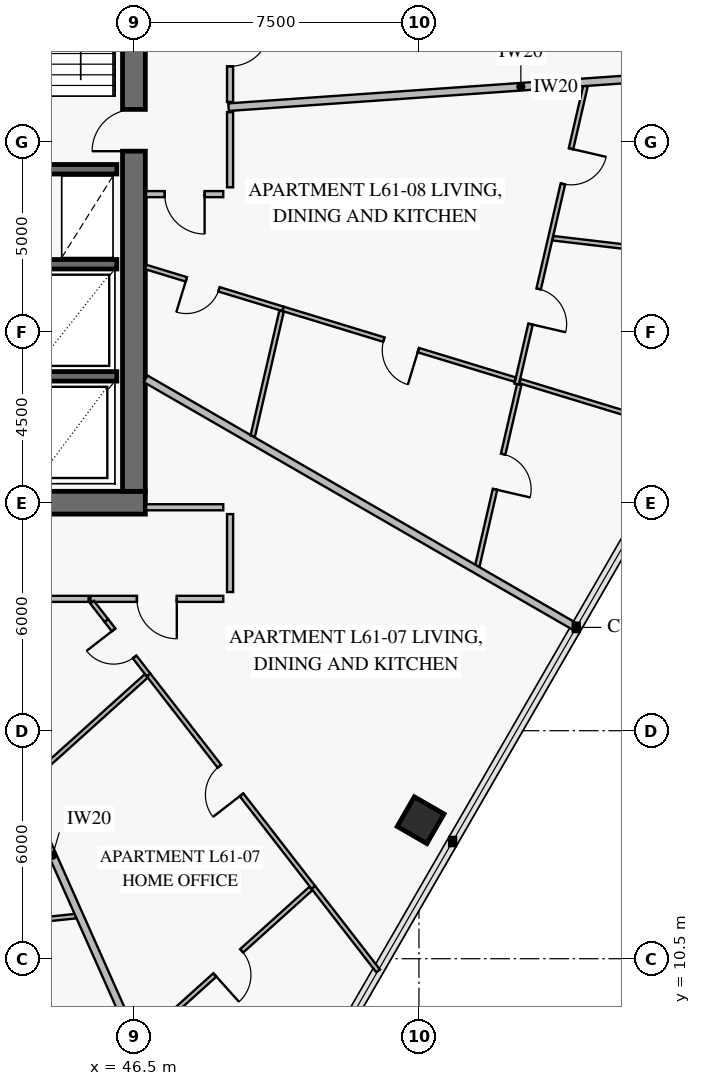
"""IFC4 building model, lengths in metres.
Left out: names, types, materials, properties, quantities, classifications, styles, units other than length and angle.
Written with IfcOpenShell. Run it as: python <this file> out.ifc"""

import sys

from ifc_helpers import new_model, si_unit, direction, frame, frame_2d, origin, origin_2d, place, context, subcontext, project, spatial, rectangle, extrude, element, fill, save


model = new_model("IFC4")
c1 = context("Model", 3, precision=1e-05, world=origin(), true_north=direction((0.0, 1.0)))
c2 = subcontext(c1, "Body", "Model", "MODEL_VIEW")
j1 = project(units=[si_unit("LENGTHUNIT", "METRE"), si_unit("PLANEANGLEUNIT", "RADIAN")], contexts=[c1])
p1 = place(None, origin())
s1 = spatial("IfcSite", under=j1, at=p1, CompositionType="ELEMENT")
p2 = place(p1, origin())
s2 = spatial("IfcBuilding", under=s1, at=p2, CompositionType="ELEMENT")
p3 = place(p2, frame((0.0, 0.0, 242.6)))
s3 = spatial("IfcBuildingStorey", under=s2, at=p3, CompositionType="ELEMENT", Elevation=242.6)
p4 = place(p3, frame((37.35, 22.5, 0.0), z_axis=(0.0, 0.0, 1.0), x_axis=(1.0, 0.0, 0.0)))
e1 = element("IfcWall", 1, at=p4, inside=s3, PredefinedType="SHEAR", context=c2, shape_type="SweptSolid", body=[
    extrude(rectangle(XDim=9.45, YDim=0.6, at=frame_2d((4.725, 0.0))), origin(), (0.0, 0.0, 1.0), 3.8),
])
p5 = place(p4, frame((3.95, 0.0, 0.0)))
e2 = element("IfcOpeningElement", 2, at=p5, cuts=e1, PredefinedType="OPENING", context=c2, shape_type="SweptSolid", body=[
    extrude(rectangle(XDim=1.5, YDim=2.15, at=frame_2d((0.75, 1.075))), frame((0.0, 0.312, 0.0), z_axis=(0.0, -1.0, 0.0), x_axis=(1.0, 0.0, 0.0)), (0.0, 0.0, 1.0), 0.624),
])
p6 = place(p3, frame((46.5, 22.8, 0.0), z_axis=(0.0, 0.0, 1.0), x_axis=(0.0, 1.0, 0.0)))
e3 = element("IfcWall", 3, at=p6, inside=s3, PredefinedType="SHEAR", context=c2, shape_type="SweptSolid", body=[
    extrude(rectangle(XDim=18.4, YDim=0.6, at=frame_2d((9.2, 0.0))), origin(), (0.0, 0.0, 1.0), 3.8),
])
p7 = place(p6, frame((8.95, 0.0, 0.0)))
e4 = element("IfcOpeningElement", 4, at=p7, cuts=e3, PredefinedType="OPENING", context=c2, shape_type="SweptSolid", body=[
    extrude(rectangle(XDim=1.1, YDim=2.15, at=frame_2d((0.55, 1.075))), frame((0.0, 0.312, 0.0), z_axis=(0.0, -1.0, 0.0), x_axis=(1.0, 0.0, 0.0)), (0.0, 0.0, 1.0), 0.624),
])
p8 = place(p3, frame((54.044, 14.145, 0.0), z_axis=(0.0, 0.0, 1.0), x_axis=(0.5, 0.866025403784, 0.0)))
e5 = element("IfcColumn", 5, at=p8, inside=s3, PredefinedType="COLUMN", context=c2, shape_type="SweptSolid", body=[
    extrude(rectangle(XDim=0.9, YDim=0.9, at=origin_2d()), origin(), (0.0, 0.0, 1.0), 3.55),
])
p9 = place(p3, frame((25.95, 31.275, 0.0), z_axis=(0.0, 0.0, 1.0), x_axis=(1.0, 0.0, 0.0)))
e6 = element("IfcWall", 6, at=p9, inside=s3, PredefinedType="SOLIDWALL", context=c2, shape_type="SweptSolid", body=[
    extrude(rectangle(XDim=20.1, YDim=0.25, at=frame_2d((10.05, 0.0))), origin(), (0.0, 0.0, 1.0), 3.8),
])
p10 = place(p9, frame((2.6, 0.0, 0.0)))
e7 = element("IfcOpeningElement", 7, at=p10, cuts=e6, PredefinedType="OPENING", context=c2, shape_type="SweptSolid", body=[
    extrude(rectangle(XDim=1.1, YDim=2.15, at=frame_2d((0.55, 1.075))), frame((0.0, 0.137, 0.0), z_axis=(0.0, -1.0, 0.0), x_axis=(1.0, 0.0, 0.0)), (0.0, 0.0, 1.0), 0.274),
])
p11 = place(p9, frame((10.6, 0.0, 0.0)))
e8 = element("IfcOpeningElement", 8, at=p11, cuts=e6, PredefinedType="OPENING", context=c2, shape_type="SweptSolid", body=[
    extrude(rectangle(XDim=1.1, YDim=2.15, at=frame_2d((0.55, 1.075))), frame((0.0, 0.137, 0.0), z_axis=(0.0, -1.0, 0.0), x_axis=(1.0, 0.0, 0.0)), (0.0, 0.0, 1.0), 0.274),
])
p12 = place(p9, frame((16.35, 0.0, 0.0)))
e9 = element("IfcOpeningElement", 9, at=p12, cuts=e6, PredefinedType="OPENING", context=c2, shape_type="SweptSolid", body=[
    extrude(rectangle(XDim=1.1, YDim=2.15, at=frame_2d((0.55, 1.075))), frame((0.0, 0.137, 0.0), z_axis=(0.0, -1.0, 0.0), x_axis=(1.0, 0.0, 0.0)), (0.0, 0.0, 1.0), 0.274),
])
for number, where, z_axis, x_axis in (
    (10, (43.8, 25.825, 0.0), (0.0, 0.0, 1.0), (1.0, 0.0, 0.0)),
    (11, (43.8, 28.775, 0.0), (0.0, 0.0, 1.0), (1.0, 0.0, 0.0)),
):
    element("IfcWall", number, at=place(p3, frame(where, z_axis=z_axis, x_axis=x_axis)), inside=s3, PredefinedType="SOLIDWALL", context=c2, shape_type="SweptSolid", body=[
        extrude(rectangle(XDim=2.25, YDim=0.25, at=frame_2d((1.125, 0.0))), origin(), (0.0, 0.0, 1.0), 3.8),
    ])
p13 = place(p3, frame((35.658, 10.642, 0.0), z_axis=(0.0, 0.0, 1.0), x_axis=(0.994519444743, 0.104551776778, 0.0)))
e12 = element("IfcWall", 12, at=p13, inside=s3, PredefinedType="PARTITIONING", context=c2, shape_type="SweptSolid", body=[
    extrude(rectangle(XDim=9.364, YDim=0.12, at=frame_2d((4.682, 0.0))), origin(), (0.0, 0.0, 1.0), 2.95),
])
p14 = place(p13, frame((1.939, 0.0, 0.0)))
e13 = element("IfcOpeningElement", 13, at=p14, cuts=e12, PredefinedType="OPENING", context=c2, shape_type="SweptSolid", body=[
    extrude(rectangle(XDim=0.95, YDim=2.1, at=frame_2d((0.475, 1.05))), frame((0.0, 0.072, 0.0), z_axis=(0.0, -1.0, 0.0), x_axis=(1.0, 0.0, 0.0)), (0.0, 0.0, 1.0), 0.144),
])
p15 = place(p13, frame((6.38, 0.0, 0.0)))
e14 = element("IfcOpeningElement", 14, at=p15, cuts=e12, PredefinedType="OPENING", context=c2, shape_type="SweptSolid", body=[
    extrude(rectangle(XDim=0.95, YDim=2.1, at=frame_2d((0.475, 1.05))), frame((0.0, 0.072, 0.0), z_axis=(0.0, -1.0, 0.0), x_axis=(1.0, 0.0, 0.0)), (0.0, 0.0, 1.0), 0.144),
])
p16 = place(p3, frame((45.773, 19.4, 0.0), z_axis=(0.0, 0.0, 1.0), x_axis=(0.612972513082, -0.790104232495, 0.0)))
e15 = element("IfcWall", 15, at=p16, inside=s3, PredefinedType="PARTITIONING", context=c2, shape_type="SweptSolid", body=[
    extrude(rectangle(XDim=1.817, YDim=0.12, at=frame_2d((0.908, 0.0))), origin(), (0.0, 0.0, 1.0), 3.55),
])
p17 = place(p16, frame((0.313, 0.0, 0.0)))
e16 = element("IfcOpeningElement", 16, at=p17, cuts=e15, PredefinedType="OPENING", context=c2, shape_type="SweptSolid", body=[
    extrude(rectangle(XDim=0.9, YDim=2.1, at=frame_2d((0.45, 1.05))), frame((0.0, 0.072, 0.0), z_axis=(0.0, -1.0, 0.0), x_axis=(1.0, 0.0, 0.0)), (0.0, 0.0, 1.0), 0.144),
])
p18 = place(p3, frame((46.887, 17.965, 0.0), z_axis=(0.0, 0.0, 1.0), x_axis=(0.612896077685, -0.790163526087, 0.0)))
e17 = element("IfcWall", 17, at=p18, inside=s3, PredefinedType="PARTITIONING", context=c2, shape_type="SweptSolid", body=[
    extrude(rectangle(XDim=7.075, YDim=0.12, at=frame_2d((3.538, 0.0))), origin(), (0.0, 0.0, 1.0), 2.93),
])
p19 = place(p18, frame((3.038, 0.0, 0.0)))
e18 = element("IfcOpeningElement", 18, at=p19, cuts=e17, PredefinedType="OPENING", context=c2, shape_type="SweptSolid", body=[
    extrude(rectangle(XDim=0.95, YDim=2.1, at=frame_2d((0.475, 1.05))), frame((0.0, 0.072, 0.0), z_axis=(0.0, -1.0, 0.0), x_axis=(1.0, 0.0, 0.0)), (0.0, 0.0, 1.0), 0.144),
])
p20 = place(p3, frame((46.682, 8.319, 0.0), z_axis=(0.0, 0.0, 1.0), x_axis=(0.743153013224, 0.669121512834, 0.0)))
e19 = element("IfcWall", 19, at=p20, inside=s3, PredefinedType="PARTITIONING", context=c2, shape_type="SweptSolid", body=[
    extrude(rectangle(XDim=6.022, YDim=0.12, at=frame_2d((3.011, 0.0))), origin(), (0.0, 0.0, 1.0), 2.93),
])
p21 = place(p20, frame((2.62, 0.0, 0.0)))
e20 = element("IfcOpeningElement", 20, at=p21, cuts=e19, PredefinedType="OPENING", context=c2, shape_type="SweptSolid", body=[
    extrude(rectangle(XDim=0.95, YDim=2.1, at=frame_2d((0.475, 1.05))), frame((0.0, 0.072, 0.0), z_axis=(0.0, -1.0, 0.0), x_axis=(1.0, 0.0, 0.0)), (0.0, 0.0, 1.0), 0.144),
])
p22 = place(p3, frame((45.357, 19.97, 0.0), z_axis=(0.0, 0.0, 1.0), x_axis=(1.0, 0.0, 0.0)))
e21 = element("IfcWall", 21, at=p22, inside=s3, PredefinedType="PARTITIONING", context=c2, shape_type="SweptSolid", body=[
    extrude(rectangle(XDim=3.493, YDim=0.16, at=frame_2d((1.747, 0.0))), origin(), (0.0, 0.0, 1.0), 2.95),
])
p23 = place(p22, frame((1.222, 0.0, 0.0)))
e22 = element("IfcOpeningElement", 22, at=p23, cuts=e21, PredefinedType="OPENING", context=c2, shape_type="SweptSolid", body=[
    extrude(rectangle(XDim=1.05, YDim=2.15, at=frame_2d((0.525, 1.075))), frame((0.0, 0.092, 0.0), z_axis=(0.0, -1.0, 0.0), x_axis=(1.0, 0.0, 0.0)), (0.0, 0.0, 1.0), 0.184),
])
p24 = place(p3, frame((56.571, 25.622, 0.0), z_axis=(0.0, 0.0, 1.0), x_axis=(0.224956917684, 0.974368711108, 0.0)))
e23 = element("IfcWall", 23, at=p24, inside=s3, PredefinedType="PARTITIONING", context=c2, shape_type="SweptSolid", body=[
    extrude(rectangle(XDim=8.054, YDim=0.12, at=frame_2d((4.027, 0.0))), origin(), (0.0, 0.0, 1.0), 2.95),
])
p25 = place(p24, frame((1.619, 0.0, 0.0)))
e24 = element("IfcOpeningElement", 24, at=p25, cuts=e23, PredefinedType="OPENING", context=c2, shape_type="SweptSolid", body=[
    extrude(rectangle(XDim=0.95, YDim=2.1, at=frame_2d((0.475, 1.05))), frame((0.0, 0.072, 0.0), z_axis=(0.0, -1.0, 0.0), x_axis=(1.0, 0.0, 0.0)), (0.0, 0.0, 1.0), 0.144),
])
p26 = place(p24, frame((5.406, 0.0, 0.0)))
e25 = element("IfcOpeningElement", 25, at=p26, cuts=e23, PredefinedType="OPENING", context=c2, shape_type="SweptSolid", body=[
    extrude(rectangle(XDim=0.95, YDim=2.1, at=frame_2d((0.475, 1.05))), frame((0.0, 0.072, 0.0), z_axis=(0.0, -1.0, 0.0), x_axis=(1.0, 0.0, 0.0)), (0.0, 0.0, 1.0), 0.144),
])
p27 = place(p3, frame((46.808, 28.704, 0.0), z_axis=(0.0, 0.0, 1.0), x_axis=(0.956504815911, -0.291716535594, 0.0)))
e26 = element("IfcWall", 26, at=p27, inside=s3, PredefinedType="PARTITIONING", context=c2, shape_type="SweptSolid", body=[
    extrude(rectangle(XDim=3.781, YDim=0.12, at=frame_2d((1.891, 0.0))), origin(), (0.0, 0.0, 1.0), 3.55),
])
p28 = place(p27, frame((1.119, 0.0, 0.0)))
e27 = element("IfcOpeningElement", 27, at=p28, cuts=e26, PredefinedType="OPENING", context=c2, shape_type="SweptSolid", body=[
    extrude(rectangle(XDim=0.9, YDim=2.1, at=frame_2d((0.45, 1.05))), frame((0.0, 0.072, 0.0), z_axis=(0.0, -1.0, 0.0), x_axis=(1.0, 0.0, 0.0)), (0.0, 0.0, 1.0), 0.144),
])
p29 = place(p3, frame((50.425, 27.601, 0.0), z_axis=(0.0, 0.0, 1.0), x_axis=(0.956517137307, -0.291676132103, 0.0)))
e28 = element("IfcWall", 28, at=p29, inside=s3, PredefinedType="PARTITIONING", context=c2, shape_type="SweptSolid", body=[
    extrude(rectangle(XDim=6.382, YDim=0.12, at=frame_2d((3.191, 0.0))), origin(), (0.0, 0.0, 1.0), 3.15),
])
p30 = place(p29, frame((2.771, 0.0, 0.0)))
e29 = element("IfcOpeningElement", 29, at=p30, cuts=e28, PredefinedType="OPENING", context=c2, shape_type="SweptSolid", body=[
    extrude(rectangle(XDim=0.95, YDim=2.1, at=frame_2d((0.475, 1.05))), frame((0.0, 0.072, 0.0), z_axis=(0.0, -1.0, 0.0), x_axis=(1.0, 0.0, 0.0)), (0.0, 0.0, 1.0), 0.144),
])
p31 = place(p3, frame((55.535, 20.833, 0.0), z_axis=(0.0, 0.0, 1.0), x_axis=(0.224979599368, 0.974363474207, 0.0)))
e30 = element("IfcWall", 30, at=p31, inside=s3, PredefinedType="PARTITIONING", context=c2, shape_type="SweptSolid", body=[
    extrude(rectangle(XDim=4.899, YDim=0.12, at=frame_2d((2.45, 0.0))), origin(), (0.0, 0.0, 1.0), 3.55),
])
p32 = place(p31, frame((2.073, 0.0, 0.0)))
e31 = element("IfcOpeningElement", 31, at=p32, cuts=e30, PredefinedType="OPENING", context=c2, shape_type="SweptSolid", body=[
    extrude(rectangle(XDim=0.95, YDim=2.1, at=frame_2d((0.475, 1.05))), frame((0.0, 0.072, 0.0), z_axis=(0.0, -1.0, 0.0), x_axis=(1.0, 0.0, 0.0)), (0.0, 0.0, 1.0), 0.144),
])
p33 = place(p3, frame((46.82, 30.62, 0.0), z_axis=(0.0, 0.0, 1.0), x_axis=(1.0, 0.0, 0.0)))
e32 = element("IfcWall", 32, at=p33, inside=s3, PredefinedType="PARTITIONING", context=c2, shape_type="SweptSolid", body=[
    extrude(rectangle(XDim=2.03, YDim=0.16, at=frame_2d((1.015, 0.0))), origin(), (0.0, 0.0, 1.0), 3.55),
])
p34 = place(p33, frame((0.49, 0.0, 0.0)))
e33 = element("IfcOpeningElement", 33, at=p34, cuts=e32, PredefinedType="OPENING", context=c2, shape_type="SweptSolid", body=[
    extrude(rectangle(XDim=1.05, YDim=2.15, at=frame_2d((0.525, 1.075))), frame((0.0, 0.092, 0.0), z_axis=(0.0, -1.0, 0.0), x_axis=(1.0, 0.0, 0.0)), (0.0, 0.0, 1.0), 0.184),
])
p35 = place(p3, frame((49.03, 33.045, 0.0), z_axis=(0.0, 0.0, 1.0), x_axis=(0.0, 1.0, 0.0)))
e34 = element("IfcWall", 34, at=p35, inside=s3, PredefinedType="PARTITIONING", context=c2, shape_type="SweptSolid", body=[
    extrude(rectangle(XDim=2.927, YDim=0.16, at=frame_2d((1.464, 0.0))), origin(), (0.0, 0.0, 1.0), 2.95),
])
p36 = place(p35, frame((0.939, 0.0, 0.0)))
e35 = element("IfcOpeningElement", 35, at=p36, cuts=e34, PredefinedType="OPENING", context=c2, shape_type="SweptSolid", body=[
    extrude(rectangle(XDim=1.05, YDim=2.15, at=frame_2d((0.525, 1.075))), frame((0.0, 0.092, 0.0), z_axis=(0.0, -1.0, 0.0), x_axis=(1.0, 0.0, 0.0)), (0.0, 0.0, 1.0), 0.184),
])
p37 = place(p3, frame((41.338, 20.01, 0.0), z_axis=(0.0, 0.0, 1.0), x_axis=(0.406725337387, -0.913550491176, 0.0)))
e36 = element("IfcWall", 36, at=p37, inside=s3, PredefinedType="PARTITIONING", context=c2, shape_type="SweptSolid", body=[
    extrude(rectangle(XDim=14.858, YDim=0.2, at=frame_2d((7.429, 0.0))), origin(), (0.0, 0.0, 1.0), 2.93),
])
p38 = place(p3, frame((45.4, 19.882, 0.0), z_axis=(0.0, 0.0, 1.0), x_axis=(0.612665415135, -0.790342387258, 0.0)))
e37 = element("IfcWall", 37, at=p38, inside=s3, PredefinedType="PARTITIONING", context=c2, shape_type="SweptSolid", body=[
    extrude(rectangle(XDim=0.61, YDim=0.12, at=frame_2d((0.305, 0.0))), origin(), (0.0, 0.0, 1.0), 3.55),
])
p39 = place(p3, frame((51.223, 12.374, 0.0), z_axis=(0.0, 0.0, 1.0), x_axis=(0.612844799687, -0.790203297574, 0.0)))
e38 = element("IfcWall", 38, at=p39, inside=s3, PredefinedType="PARTITIONING", context=c2, shape_type="SweptSolid", body=[
    extrude(rectangle(XDim=2.778, YDim=0.12, at=frame_2d((1.389, 0.0))), origin(), (0.0, 0.0, 1.0), 3.55),
])
p40 = place(p3, frame((43.65, 15.083, 0.0), z_axis=(0.0, 0.0, 1.0), x_axis=(0.743154729862, 0.669119606262, 0.0)))
e39 = element("IfcWall", 39, at=p40, inside=s3, PredefinedType="PARTITIONING", context=c2, shape_type="SweptSolid", body=[
    extrude(rectangle(XDim=4.267, YDim=0.12, at=frame_2d((2.134, 0.0))), origin(), (0.0, 0.0, 1.0), 3.55),
])
p41 = place(p3, frame((46.808, 25.76, 0.0), z_axis=(0.0, 0.0, 1.0), x_axis=(0.86602399778, -0.500002435262, 0.0)))
e40 = element("IfcWall", 40, at=p41, inside=s3, PredefinedType="PARTITIONING", context=c2, shape_type="SweptSolid", body=[
    extrude(rectangle(XDim=13.083, YDim=0.2, at=frame_2d((6.542, 0.0))), origin(), (0.0, 0.0, 1.0), 2.93),
])
p42 = place(p3, frame((57.527, 29.46, 0.0), z_axis=(0.0, 0.0, 1.0), x_axis=(0.993110118833, -0.117184861953, 0.0)))
e41 = element("IfcWall", 41, at=p42, inside=s3, PredefinedType="PARTITIONING", context=c2, shape_type="SweptSolid", body=[
    extrude(rectangle(XDim=6.184, YDim=0.12, at=frame_2d((3.092, 0.0))), origin(), (0.0, 0.0, 1.0), 2.93),
])
p43 = place(p3, frame((56.659, 25.7, 0.0), z_axis=(0.0, 0.0, 1.0), x_axis=(0.9564987051, -0.291736571484, 0.0)))
e42 = element("IfcWall", 42, at=p43, inside=s3, PredefinedType="PARTITIONING", context=c2, shape_type="SweptSolid", body=[
    extrude(rectangle(XDim=4.646, YDim=0.12, at=frame_2d((2.323, 0.0))), origin(), (0.0, 0.0, 1.0), 2.93),
])
p44 = place(p3, frame((49.627, 24.257, 0.0), z_axis=(0.0, 0.0, 1.0), x_axis=(0.224944134333, 0.97437166237, 0.0)))
e43 = element("IfcWall", 43, at=p44, inside=s3, PredefinedType="PARTITIONING", context=c2, shape_type="SweptSolid", body=[
    extrude(rectangle(XDim=3.371, YDim=0.12, at=frame_2d((1.686, 0.0))), origin(), (0.0, 0.0, 1.0), 3.55),
])
p45 = place(p3, frame((48.99, 32.908, 0.0), z_axis=(0.0, 0.0, 1.0), x_axis=(0.997563993595, 0.069757284087, 0.0)))
e44 = element("IfcWall", 44, at=p45, inside=s3, PredefinedType="PARTITIONING", context=c2, shape_type="SweptSolid", body=[
    extrude(rectangle(XDim=15.42, YDim=0.2, at=frame_2d((7.71, 0.0))), origin(), (0.0, 0.0, 1.0), 2.93),
])
p46 = place(p3, frame((49.03, 20.15, 0.0), z_axis=(0.0, 0.0, 1.0), x_axis=(0.0, 1.0, 0.0)))
e45 = element("IfcWall", 45, at=p46, inside=s3, PredefinedType="PARTITIONING", context=c2, shape_type="SweptSolid", body=[
    extrude(rectangle(XDim=2.05, YDim=0.16, at=frame_2d((1.025, 0.0))), origin(), (0.0, 0.0, 1.0), 3.55),
])
p47 = place(p3, frame((48.85, 22.38, 0.0), z_axis=(0.0, 0.0, 1.0), x_axis=(-1.0, 0.0, 0.0)))
e46 = element("IfcWall", 46, at=p47, inside=s3, PredefinedType="PARTITIONING", context=c2, shape_type="SweptSolid", body=[
    extrude(rectangle(XDim=2.03, YDim=0.16, at=frame_2d((1.015, 0.0))), origin(), (0.0, 0.0, 1.0), 3.55),
])
p48 = place(p3, frame((41.504, 19.97, 0.0), z_axis=(0.0, 0.0, 1.0), x_axis=(1.0, 0.0, 0.0)))
e47 = element("IfcWall", 47, at=p48, inside=s3, PredefinedType="PARTITIONING", context=c2, shape_type="SweptSolid", body=[
    extrude(rectangle(XDim=3.802, YDim=0.16, at=frame_2d((1.901, 0.0))), origin(), (0.0, 0.0, 1.0), 3.55),
])
p49 = place(p3, frame((49.03, 30.8, 0.0), z_axis=(0.0, 0.0, 1.0), x_axis=(0.0, 1.0, 0.0)))
e48 = element("IfcWall", 48, at=p49, inside=s3, PredefinedType="PARTITIONING", context=c2, shape_type="SweptSolid", body=[
    extrude(rectangle(XDim=1.977, YDim=0.16, at=frame_2d((0.988, 0.0))), origin(), (0.0, 0.0, 1.0), 3.55),
])
p50 = place(p7, origin())
e49 = element("IfcDoor", 49, at=p50, inside=s3, OperationType="SINGLE_SWING_LEFT", PredefinedType="USERDEFINED", context=c2, shape_type="SweptSolid", body=[
    extrude(rectangle(XDim=1.1, YDim=2.15, at=frame_2d((0.55, 1.075))), frame((0.0, 0.025, 0.0), z_axis=(0.0, -1.0, 0.0), x_axis=(1.0, 0.0, 0.0)), (0.0, 0.0, 1.0), 0.05),
])
fill(e4, e49)
p51 = place(p17, frame((0.9, 0.0, 0.0), z_axis=(0.0, 0.0, 1.0), x_axis=(-1.0, 0.0, 0.0)))
e50 = element("IfcDoor", 50, at=p51, inside=s3, OperationType="SINGLE_SWING_RIGHT", PredefinedType="DOOR", context=c2, shape_type="SweptSolid", body=[
    extrude(rectangle(XDim=0.9, YDim=2.1, at=frame_2d((0.45, 1.05))), frame((0.0, 0.025, 0.0), z_axis=(0.0, -1.0, 0.0), x_axis=(1.0, 0.0, 0.0)), (0.0, 0.0, 1.0), 0.05),
])
fill(e16, e50)
p52 = place(p19, frame((0.95, 0.0, 0.0), z_axis=(0.0, 0.0, 1.0), x_axis=(-1.0, 0.0, 0.0)))
e51 = element("IfcDoor", 51, at=p52, inside=s3, OperationType="SINGLE_SWING_LEFT", PredefinedType="DOOR", context=c2, shape_type="SweptSolid", body=[
    extrude(rectangle(XDim=0.95, YDim=2.1, at=frame_2d((0.475, 1.05))), frame((0.0, 0.025, 0.0), z_axis=(0.0, -1.0, 0.0), x_axis=(1.0, 0.0, 0.0)), (0.0, 0.0, 1.0), 0.05),
])
fill(e18, e51)
p53 = place(p21, frame((0.95, 0.0, 0.0), z_axis=(0.0, 0.0, 1.0), x_axis=(-1.0, 0.0, 0.0)))
e52 = element("IfcDoor", 52, at=p53, inside=s3, OperationType="SINGLE_SWING_RIGHT", PredefinedType="DOOR", context=c2, shape_type="SweptSolid", body=[
    extrude(rectangle(XDim=0.95, YDim=2.1, at=frame_2d((0.475, 1.05))), frame((0.0, 0.025, 0.0), z_axis=(0.0, -1.0, 0.0), x_axis=(1.0, 0.0, 0.0)), (0.0, 0.0, 1.0), 0.05),
])
fill(e20, e52)
p54 = place(p23, frame((1.05, 0.0, 0.0), z_axis=(0.0, 0.0, 1.0), x_axis=(-1.0, 0.0, 0.0)))
e53 = element("IfcDoor", 53, at=p54, inside=s3, OperationType="SINGLE_SWING_LEFT", PredefinedType="DOOR", context=c2, shape_type="SweptSolid", body=[
    extrude(rectangle(XDim=1.05, YDim=2.15, at=frame_2d((0.525, 1.075))), frame((0.0, 0.025, 0.0), z_axis=(0.0, -1.0, 0.0), x_axis=(1.0, 0.0, 0.0)), (0.0, 0.0, 1.0), 0.05),
])
fill(e22, e53)
p55 = place(p25, frame((0.95, 0.0, 0.0), z_axis=(0.0, 0.0, 1.0), x_axis=(-1.0, 0.0, 0.0)))
e54 = element("IfcDoor", 54, at=p55, inside=s3, OperationType="SINGLE_SWING_RIGHT", PredefinedType="DOOR", context=c2, shape_type="SweptSolid", body=[
    extrude(rectangle(XDim=0.95, YDim=2.1, at=frame_2d((0.475, 1.05))), frame((0.0, 0.025, 0.0), z_axis=(0.0, -1.0, 0.0), x_axis=(1.0, 0.0, 0.0)), (0.0, 0.0, 1.0), 0.05),
])
fill(e24, e54)
p56 = place(p26, frame((0.95, 0.0, 0.0), z_axis=(0.0, 0.0, 1.0), x_axis=(-1.0, 0.0, 0.0)))
e55 = element("IfcDoor", 55, at=p56, inside=s3, OperationType="SINGLE_SWING_LEFT", PredefinedType="DOOR", context=c2, shape_type="SweptSolid", body=[
    extrude(rectangle(XDim=0.95, YDim=2.1, at=frame_2d((0.475, 1.05))), frame((0.0, 0.025, 0.0), z_axis=(0.0, -1.0, 0.0), x_axis=(1.0, 0.0, 0.0)), (0.0, 0.0, 1.0), 0.05),
])
fill(e25, e55)
p57 = place(p28, frame((0.9, 0.0, 0.0), z_axis=(0.0, 0.0, 1.0), x_axis=(-1.0, 0.0, 0.0)))
e56 = element("IfcDoor", 56, at=p57, inside=s3, OperationType="SINGLE_SWING_RIGHT", PredefinedType="DOOR", context=c2, shape_type="SweptSolid", body=[
    extrude(rectangle(XDim=0.9, YDim=2.1, at=frame_2d((0.45, 1.05))), frame((0.0, 0.025, 0.0), z_axis=(0.0, -1.0, 0.0), x_axis=(1.0, 0.0, 0.0)), (0.0, 0.0, 1.0), 0.05),
])
fill(e27, e56)
p58 = place(p30, frame((0.95, 0.0, 0.0), z_axis=(0.0, 0.0, 1.0), x_axis=(-1.0, 0.0, 0.0)))
e57 = element("IfcDoor", 57, at=p58, inside=s3, OperationType="SINGLE_SWING_LEFT", PredefinedType="DOOR", context=c2, shape_type="SweptSolid", body=[
    extrude(rectangle(XDim=0.95, YDim=2.1, at=frame_2d((0.475, 1.05))), frame((0.0, 0.025, 0.0), z_axis=(0.0, -1.0, 0.0), x_axis=(1.0, 0.0, 0.0)), (0.0, 0.0, 1.0), 0.05),
])
fill(e29, e57)
p59 = place(p32, frame((0.95, 0.0, 0.0), z_axis=(0.0, 0.0, 1.0), x_axis=(-1.0, 0.0, 0.0)))
e58 = element("IfcDoor", 58, at=p59, inside=s3, OperationType="SINGLE_SWING_RIGHT", PredefinedType="DOOR", context=c2, shape_type="SweptSolid", body=[
    extrude(rectangle(XDim=0.95, YDim=2.1, at=frame_2d((0.475, 1.05))), frame((0.0, 0.025, 0.0), z_axis=(0.0, -1.0, 0.0), x_axis=(1.0, 0.0, 0.0)), (0.0, 0.0, 1.0), 0.05),
])
fill(e31, e58)
p60 = place(p34, frame((1.05, 0.0, 0.0), z_axis=(0.0, 0.0, 1.0), x_axis=(-1.0, 0.0, 0.0)))
e59 = element("IfcDoor", 59, at=p60, inside=s3, OperationType="SINGLE_SWING_LEFT", PredefinedType="DOOR", context=c2, shape_type="SweptSolid", body=[
    extrude(rectangle(XDim=1.05, YDim=2.15, at=frame_2d((0.525, 1.075))), frame((0.0, 0.025, 0.0), z_axis=(0.0, -1.0, 0.0), x_axis=(1.0, 0.0, 0.0)), (0.0, 0.0, 1.0), 0.05),
])
fill(e33, e59)
p61 = place(p36, frame((1.05, 0.0, 0.0), z_axis=(0.0, 0.0, 1.0), x_axis=(-1.0, 0.0, 0.0)))
e60 = element("IfcDoor", 60, at=p61, inside=s3, OperationType="SINGLE_SWING_LEFT", PredefinedType="DOOR", context=c2, shape_type="SweptSolid", body=[
    extrude(rectangle(XDim=1.05, YDim=2.15, at=frame_2d((0.525, 1.075))), frame((0.0, 0.025, 0.0), z_axis=(0.0, -1.0, 0.0), x_axis=(1.0, 0.0, 0.0)), (0.0, 0.0, 1.0), 0.05),
])
fill(e35, e60)
save(model, sys.argv[1])
